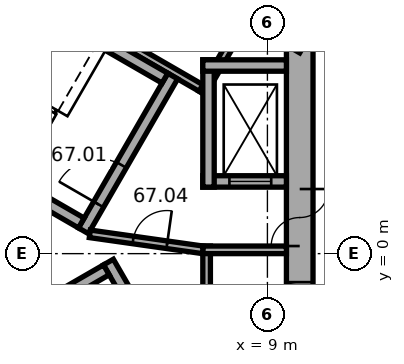
"""IFC4 building model, lengths in metres.
Left out: names, types, materials, properties, quantities, classifications, styles, units other than length and angle.
Written with IfcOpenShell. Run it as: python <this file> out.ifc"""

import sys

from ifc_helpers import new_model, si_unit, direction, frame, frame_2d, origin, place, context, subcontext, project, spatial, rectangle, extrude, element, fill, save


model = new_model("IFC4")
c1 = context("Model", 3, precision=1e-05, world=origin(), true_north=direction((0.0, 1.0)))
c2 = subcontext(c1, "Body", "Model", "MODEL_VIEW")
j1 = project(units=[si_unit("LENGTHUNIT", "METRE"), si_unit("PLANEANGLEUNIT", "RADIAN")], contexts=[c1])
p1 = place(None, origin())
s1 = spatial("IfcSite", under=j1, at=p1, CompositionType="ELEMENT")
p2 = place(p1, origin())
s2 = spatial("IfcBuilding", under=s1, at=p2, CompositionType="ELEMENT")
p3 = place(p2, frame((0.0, 0.0, 270.9)))
s3 = spatial("IfcBuildingStorey", under=s2, at=p3, CompositionType="ELEMENT", Elevation=270.9)
p4 = place(p3, frame((9.85, -5.889, 0.0), z_axis=(0.0, 0.0, 1.0), x_axis=(0.0, 1.0, 0.0)))
e1 = element("IfcWall", 1, at=p4, inside=s3, PredefinedType="SHEAR", context=c2, shape_type="SweptSolid", body=[
    extrude(rectangle(XDim=11.778, YDim=0.7, at=frame_2d((5.889, 0.0))), origin(), (0.0, 0.0, 1.0), 3.7),
])
p5 = place(p4, frame((6.089, 0.0, 0.0)))
e2 = element("IfcOpeningElement", 2, at=p5, cuts=e1, PredefinedType="OPENING", context=c2, shape_type="SweptSolid", body=[
    extrude(rectangle(XDim=1.5, YDim=2.1, at=frame_2d((0.75, 1.05))), frame((0.0, 0.36, 0.0), z_axis=(0.0, -1.0, 0.0), x_axis=(1.0, 0.0, 0.0)), (0.0, 0.0, 1.0), 0.72),
])
p6 = place(p4, frame((1.639, 0.0, 0.0)))
e3 = element("IfcOpeningElement", 3, at=p6, cuts=e1, PredefinedType="OPENING", context=c2, shape_type="SweptSolid", body=[
    extrude(rectangle(XDim=0.9, YDim=2.1, at=frame_2d((0.45, 1.05))), frame((0.0, 0.36, 0.0), z_axis=(0.0, -1.0, 0.0), x_axis=(1.0, 0.0, 0.0)), (0.0, 0.0, 1.0), 0.72),
])
p7 = place(p4, frame((4.239, 0.0, 0.0)))
e4 = element("IfcOpeningElement", 4, at=p7, cuts=e1, PredefinedType="OPENING", context=c2, shape_type="SweptSolid", body=[
    extrude(rectangle(XDim=0.9, YDim=2.1, at=frame_2d((0.45, 1.05))), frame((0.0, 0.36, 0.0), z_axis=(0.0, -1.0, 0.0), x_axis=(1.0, 0.0, 0.0)), (0.0, 0.0, 1.0), 0.72),
])
p8 = place(p3, frame((10.025, 5.586, 0.0), z_axis=(0.0, 0.0, 1.0), x_axis=(-0.866026453023, 0.499998182661, 0.0)))
e5 = element("IfcWall", 5, at=p8, inside=s3, PredefinedType="SHEAR", context=c2, shape_type="SweptSolid", body=[
    extrude(rectangle(XDim=11.778, YDim=0.7, at=frame_2d((5.889, 0.0))), origin(), (0.0, 0.0, 1.0), 3.7),
])
p9 = place(p8, frame((5.139, 0.0, 0.0)))
e6 = element("IfcOpeningElement", 6, at=p9, cuts=e5, PredefinedType="OPENING", context=c2, shape_type="SweptSolid", body=[
    extrude(rectangle(XDim=0.9, YDim=2.1, at=frame_2d((0.45, 1.05))), frame((0.0, 0.36, 0.0), z_axis=(0.0, -1.0, 0.0), x_axis=(1.0, 0.0, 0.0)), (0.0, 0.0, 1.0), 0.72),
])
p10 = place(p3, frame((7.4, -5.2, 0.0), z_axis=(0.0, 0.0, 1.0), x_axis=(0.0, 1.0, 0.0)))
e7 = element("IfcWall", 7, at=p10, inside=s3, PredefinedType="PARTITIONING", context=c2, shape_type="SweptSolid", body=[
    extrude(rectangle(XDim=5.4, YDim=0.2, at=frame_2d((2.7, 0.0))), origin(), (0.0, 0.0, 1.0), 3.42),
])
p11 = place(p3, frame((7.3, 0.1, 0.0), z_axis=(0.0, 0.0, 1.0), x_axis=(1.0, 0.0, 0.0)))
e8 = element("IfcWall", 8, at=p11, inside=s3, PredefinedType="PARTITIONING", context=c2, shape_type="SweptSolid", body=[
    extrude(rectangle(XDim=2.2, YDim=0.2, at=frame_2d((1.1, 0.0))), origin(), (0.0, 0.0, 1.0), 3.42),
])
p12 = place(p3, frame((7.424, 4.259, 0.0), z_axis=(0.0, 0.0, 1.0), x_axis=(-0.866026010844, 0.49999894854, 0.0)))
e9 = element("IfcWall", 9, at=p12, inside=s3, PredefinedType="PARTITIONING", context=c2, shape_type="SweptSolid", body=[
    extrude(rectangle(XDim=8.0, YDim=0.2, at=frame_2d((4.0, 0.0))), origin(), (0.0, 0.0, 1.0), 3.42),
])
p13 = place(p3, frame((7.287, 4.222, 0.0), z_axis=(0.0, 0.0, 1.0), x_axis=(0.499946605688, 0.86605622881, 0.0)))
e10 = element("IfcWall", 10, at=p13, inside=s3, PredefinedType="PARTITIONING", context=c2, shape_type="SweptSolid", body=[
    extrude(rectangle(XDim=2.2, YDim=0.2, at=frame_2d((1.1, 0.0))), origin(), (0.0, 0.0, 1.0), 3.42),
])
p14 = place(p3, frame((4.158, 0.602, 0.0), z_axis=(0.0, 0.0, 1.0), x_axis=(0.499977259774, 0.866038532462, 0.0)))
e11 = element("IfcWall", 11, at=p14, inside=s3, PredefinedType="SHEAR", context=c2, shape_type="SweptSolid", body=[
    extrude(rectangle(XDim=4.7, YDim=0.3, at=frame_2d((2.35, 0.0))), origin(), (0.0, 0.0, 1.0), 3.42),
])
p15 = place(p14, frame((0.8, 0.0, 0.0)))
e12 = element("IfcOpeningElement", 12, at=p15, cuts=e11, PredefinedType="OPENING", context=c2, shape_type="SweptSolid", body=[
    extrude(rectangle(XDim=1.2, YDim=2.1, at=frame_2d((0.6, 1.05))), frame((0.0, 0.16, 0.0), z_axis=(0.0, -1.0, 0.0), x_axis=(1.0, 0.0, 0.0)), (0.0, 0.0, 1.0), 0.32),
])
for number, where, z_axis, x_axis in (
    (13, (4.103, 0.807, 0.0), (0.0, 0.0, 1.0), (-0.866, 0.5, 0.0)),
    (14, (6.303, 4.617, 0.0), (0.0, 0.0, 1.0), (-0.866, 0.5, 0.0)),
):
    element("IfcWall", number, at=place(p3, frame(where, z_axis=z_axis, x_axis=x_axis)), inside=s3, PredefinedType="SHEAR", context=c2, shape_type="SweptSolid", body=[
        extrude(rectangle(XDim=7.06, YDim=0.3, at=frame_2d((3.53, 0.0))), origin(), (0.0, 0.0, 1.0), 3.42),
    ])
p16 = place(p3, frame((4.816, -0.222, 0.0), z_axis=(0.0, 0.0, 1.0), x_axis=(0.499977259774, -0.866038532462, 0.0)))
e15 = element("IfcWall", 15, at=p16, inside=s3, PredefinedType="SHEAR", context=c2, shape_type="SweptSolid", body=[
    extrude(rectangle(XDim=4.7, YDim=0.3, at=frame_2d((2.35, 0.0))), origin(), (0.0, 0.0, 1.0), 3.42),
])
p17 = place(p3, frame((-1.353, -3.957, 0.0), z_axis=(0.0, 0.0, 1.0), x_axis=(0.866027801685, 0.499995846692, 0.0)))
e16 = element("IfcWall", 16, at=p17, inside=s3, PredefinedType="SHEAR", context=c2, shape_type="SweptSolid", body=[
    extrude(rectangle(XDim=7.06, YDim=0.3, at=frame_2d((3.53, 0.0))), origin(), (0.0, 0.0, 1.0), 3.42),
])
p18 = place(p3, frame((7.3, 1.9, 0.0), z_axis=(0.0, 0.0, 1.0), x_axis=(1.0, 0.0, 0.0)))
e17 = element("IfcWall", 17, at=p18, inside=s3, PredefinedType="SHEAR", context=c2, shape_type="SweptSolid", body=[
    extrude(rectangle(XDim=2.2, YDim=0.3, at=frame_2d((1.1, 0.0))), origin(), (0.0, 0.0, 1.0), 3.42),
])
p19 = place(p18, frame((0.7, 0.0, 0.0)))
e18 = element("IfcOpeningElement", 18, at=p19, cuts=e17, PredefinedType="OPENING", context=c2, shape_type="SweptSolid", body=[
    extrude(rectangle(XDim=1.1, YDim=2.1, at=frame_2d((0.55, 1.05))), frame((0.0, 0.16, 0.0), z_axis=(0.0, -1.0, 0.0), x_axis=(1.0, 0.0, 0.0)), (0.0, 0.0, 1.0), 0.32),
])
p20 = place(p3, frame((7.45, 1.75, 0.0), z_axis=(0.0, 0.0, 1.0), x_axis=(0.0, 1.0, 0.0)))
e19 = element("IfcWall", 19, at=p20, inside=s3, PredefinedType="SHEAR", context=c2, shape_type="SweptSolid", body=[
    extrude(rectangle(XDim=3.35, YDim=0.3, at=frame_2d((1.675, 0.0))), origin(), (0.0, 0.0, 1.0), 3.42),
])
p21 = place(p3, frame((7.3, 4.95, 0.0), z_axis=(0.0, 0.0, 1.0), x_axis=(1.0, 0.0, 0.0)))
e20 = element("IfcWall", 20, at=p21, inside=s3, PredefinedType="SHEAR", context=c2, shape_type="SweptSolid", body=[
    extrude(rectangle(XDim=2.2, YDim=0.3, at=frame_2d((1.1, 0.0))), origin(), (0.0, 0.0, 1.0), 3.42),
])
p22 = place(p3, frame((4.327, 0.521, 0.0), z_axis=(0.0, 0.0, 1.0), x_axis=(0.990124376366, -0.14019172346, 0.0)))
e21 = element("IfcWall", 21, at=p22, inside=s3, PredefinedType="PARTITIONING", context=c2, shape_type="SweptSolid", body=[
    extrude(rectangle(XDim=3.002, YDim=0.2, at=frame_2d((1.501, 0.0))), origin(), (0.0, 0.0, 1.0), 3.42),
])
p23 = place(p22, frame((1.15, 0.0, 0.0)))
e22 = element("IfcOpeningElement", 22, at=p23, cuts=e21, PredefinedType="OPENING", context=c2, shape_type="SweptSolid", body=[
    extrude(rectangle(XDim=0.9, YDim=2.1, at=frame_2d((0.45, 1.05))), frame((0.0, 0.11, 0.0), z_axis=(0.0, -1.0, 0.0), x_axis=(1.0, 0.0, 0.0)), (0.0, 0.0, 1.0), 0.22),
])
p24 = place(p5, origin())
e23 = element("IfcDoor", 23, at=p24, inside=s3, OperationType="DOUBLE_DOOR_SINGLE_SWING", PredefinedType="DOOR", context=c2, shape_type="SweptSolid", body=[
    extrude(rectangle(XDim=1.5, YDim=2.1, at=frame_2d((0.75, 1.05))), frame((0.0, 0.025, 0.0), z_axis=(0.0, -1.0, 0.0), x_axis=(1.0, 0.0, 0.0)), (0.0, 0.0, 1.0), 0.05),
])
fill(e2, e23)
p25 = place(p15, origin())
e24 = element("IfcDoor", 24, at=p25, inside=s3, OperationType="SINGLE_SWING_RIGHT", PredefinedType="DOOR", context=c2, shape_type="SweptSolid", body=[
    extrude(rectangle(XDim=1.2, YDim=2.1, at=frame_2d((0.6, 1.05))), frame((0.0, 0.025, 0.0), z_axis=(0.0, -1.0, 0.0), x_axis=(1.0, 0.0, 0.0)), (0.0, 0.0, 1.0), 0.05),
])
fill(e12, e24)
p26 = place(p23, origin())
e25 = element("IfcDoor", 25, at=p26, inside=s3, OperationType="SINGLE_SWING_LEFT", PredefinedType="DOOR", context=c2, shape_type="SweptSolid", body=[
    extrude(rectangle(XDim=0.9, YDim=2.1, at=frame_2d((0.45, 1.05))), frame((0.0, 0.025, 0.0), z_axis=(0.0, -1.0, 0.0), x_axis=(1.0, 0.0, 0.0)), (0.0, 0.0, 1.0), 0.05),
])
fill(e22, e25)
p27 = place(p7, origin())
e26 = element("IfcDoor", 26, at=p27, inside=s3, OperationType="SINGLE_SWING_LEFT", PredefinedType="DOOR", context=c2, shape_type="SweptSolid", body=[
    extrude(rectangle(XDim=0.9, YDim=2.1, at=frame_2d((0.45, 1.05))), frame((0.0, 0.025, 0.0), z_axis=(0.0, -1.0, 0.0), x_axis=(1.0, 0.0, 0.0)), (0.0, 0.0, 1.0), 0.05),
])
fill(e4, e26)
p28 = place(p19, origin())
e27 = element("IfcDoor", 27, at=p28, inside=s3, OperationType="DOUBLE_DOOR_SLIDING", PredefinedType="DOOR", context=c2, shape_type="SweptSolid", body=[
    extrude(rectangle(XDim=1.1, YDim=2.1, at=frame_2d((0.55, 1.05))), frame((0.0, 0.025, 0.0), z_axis=(0.0, -1.0, 0.0), x_axis=(1.0, 0.0, 0.0)), (0.0, 0.0, 1.0), 0.05),
])
fill(e18, e27)
save(model, sys.argv[1])
